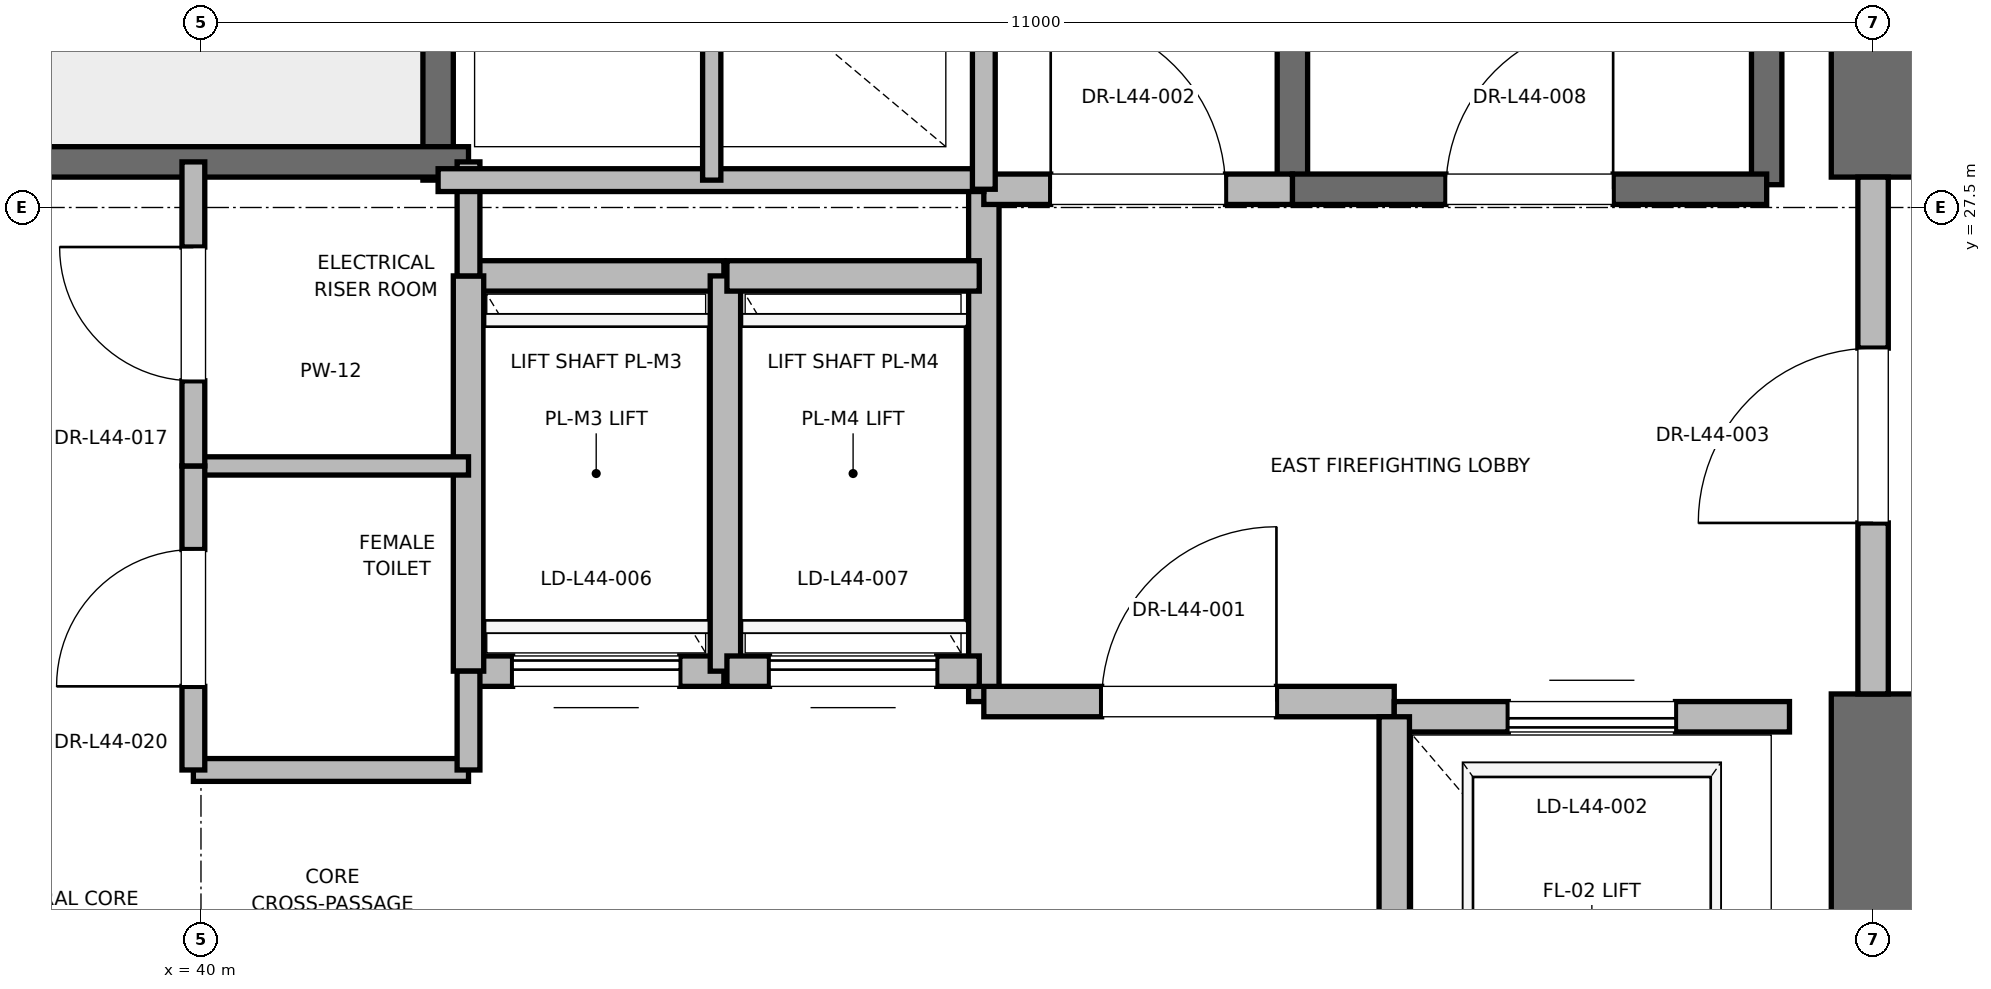
"""IFC4 building model, lengths in metres.
Left out: names, types, materials, properties, quantities, classifications, styles, units other than length and angle.
Written with IfcOpenShell. Run it as: python <this file> out.ifc"""

import sys

from ifc_helpers import new_model, si_unit, direction, frame, frame_2d, origin, place, context, subcontext, project, spatial, rectangle, extrude, element, fill, save


model = new_model("IFC4")
c1 = context("Model", 3, precision=1e-05, world=origin(), true_north=direction((0.0, 1.0)))
c2 = subcontext(c1, "Body", "Model", "MODEL_VIEW")
j1 = project(units=[si_unit("LENGTHUNIT", "METRE"), si_unit("PLANEANGLEUNIT", "RADIAN")], contexts=[c1])
p1 = place(None, origin())
s1 = spatial("IfcSite", under=j1, at=p1, CompositionType="ELEMENT")
p2 = place(p1, origin())
s2 = spatial("IfcBuilding", under=s1, at=p2, CompositionType="ELEMENT")
p3 = place(p2, frame((0.0, 0.0, 189.4)))
s3 = spatial("IfcBuildingStorey", under=s2, at=p3, CompositionType="ELEMENT", Elevation=189.4)
p4 = place(p3, frame((51.0, 18.5, 0.0), z_axis=(0.0, 0.0, 1.0), x_axis=(0.0, 1.0, 0.0)))
e1 = element("IfcWall", 1, at=p4, inside=s3, PredefinedType="SHEAR", context=c2, shape_type="SweptSolid", body=[
    extrude(rectangle(XDim=5.8, YDim=0.55, at=frame_2d((2.9, 0.0))), origin(), (0.0, 0.0, 1.0), 5.1),
])
p5 = place(p3, frame((51.0, 27.7, 0.0), z_axis=(0.0, 0.0, 1.0), x_axis=(0.0, 1.0, 0.0)))
e2 = element("IfcWall", 2, at=p5, inside=s3, PredefinedType="SHEAR", context=c2, shape_type="SweptSolid", body=[
    extrude(rectangle(XDim=8.8, YDim=0.55, at=frame_2d((4.4, 0.0))), origin(), (0.0, 0.0, 1.0), 5.1),
])
p6 = place(p3, frame((50.3, 27.65, 0.0), z_axis=(0.0, 0.0, 1.0), x_axis=(0.0, 1.0, 0.0)))
e3 = element("IfcWall", 3, at=p6, inside=s3, PredefinedType="SOLIDWALL", context=c2, shape_type="SweptSolid", body=[
    extrude(rectangle(XDim=8.15, YDim=0.2, at=frame_2d((4.075, 0.0))), origin(), (0.0, 0.0, 1.0), 5.1),
])
p7 = place(p3, frame((47.18, 27.62, 0.0), z_axis=(0.0, 0.0, 1.0), x_axis=(0.0, 1.0, 0.0)))
e4 = element("IfcWall", 4, at=p7, inside=s3, PredefinedType="SOLIDWALL", context=c2, shape_type="SweptSolid", body=[
    extrude(rectangle(XDim=8.18, YDim=0.2, at=frame_2d((4.09, 0.0))), origin(), (0.0, 0.0, 1.0), 5.1),
])
p8 = place(p3, frame((47.18, 27.62, 0.0), z_axis=(0.0, 0.0, 1.0), x_axis=(1.0, 0.0, 0.0)))
e5 = element("IfcWall", 5, at=p8, inside=s3, PredefinedType="SOLIDWALL", context=c2, shape_type="SweptSolid", body=[
    extrude(rectangle(XDim=3.12, YDim=0.2, at=frame_2d((1.56, 0.0))), origin(), (0.0, 0.0, 1.0), 5.1),
])
p9 = place(p8, frame((1.01, 0.0, 0.0)))
e6 = element("IfcOpeningElement", 6, at=p9, cuts=e5, PredefinedType="OPENING", context=c2, shape_type="SweptSolid", body=[
    extrude(rectangle(XDim=1.1, YDim=2.15, at=frame_2d((0.55, 1.075))), frame((0.0, 0.1, 0.0), z_axis=(0.0, -1.0, 0.0), x_axis=(1.0, 0.0, 0.0)), (0.0, 0.0, 1.0), 0.2),
])
p10 = place(p3, frame((41.56, 27.68, 0.0), z_axis=(0.0, 0.0, 1.0), x_axis=(0.0, 1.0, 0.0)))
e7 = element("IfcWall", 7, at=p10, inside=s3, PredefinedType="SOLIDWALL", context=c2, shape_type="SweptSolid", body=[
    extrude(rectangle(XDim=8.57, YDim=0.2, at=frame_2d((4.285, 0.0))), origin(), (0.0, 0.0, 1.0), 5.1),
])
p11 = place(p3, frame((38.44, 27.8, 0.0), z_axis=(0.0, 0.0, 1.0), x_axis=(1.0, 0.0, 0.0)))
e8 = element("IfcWall", 8, at=p11, inside=s3, PredefinedType="SOLIDWALL", context=c2, shape_type="SweptSolid", body=[
    extrude(rectangle(XDim=3.32, YDim=0.2, at=frame_2d((1.66, 0.0))), origin(), (0.0, 0.0, 1.0), 5.1),
])
p12 = place(p3, frame((45.15, 24.25, 0.0), z_axis=(0.0, 0.0, 1.0), x_axis=(0.0, 1.0, 0.0)))
e9 = element("IfcWall", 9, at=p12, inside=s3, PredefinedType="PARTITIONING", context=c2, shape_type="SweptSolid", body=[
    extrude(rectangle(XDim=3.37, YDim=0.2, at=frame_2d((1.685, 0.0))), origin(), (0.0, 0.0, 1.0), 5.1),
])
p13 = place(p3, frame((45.15, 24.25, 0.0), z_axis=(0.0, 0.0, 1.0), x_axis=(1.0, 0.0, 0.0)))
e10 = element("IfcWall", 10, at=p13, inside=s3, PredefinedType="PARTITIONING", context=c2, shape_type="SweptSolid", body=[
    extrude(rectangle(XDim=2.7, YDim=0.2, at=frame_2d((1.35, 0.0))), origin(), (0.0, 0.0, 1.0), 5.1),
])
p14 = place(p13, frame((0.775, 0.0, 0.0)))
e11 = element("IfcOpeningElement", 11, at=p14, cuts=e10, PredefinedType="OPENING", context=c2, shape_type="SweptSolid", body=[
    extrude(rectangle(XDim=1.15, YDim=2.2, at=frame_2d((0.575, 1.1))), frame((0.0, 0.1, 0.0), z_axis=(0.0, -1.0, 0.0), x_axis=(1.0, 0.0, 0.0)), (0.0, 0.0, 1.0), 0.2),
])
p15 = place(p3, frame((45.15, 27.62, 0.0), z_axis=(0.0, 0.0, 1.0), x_axis=(1.0, 0.0, 0.0)))
e12 = element("IfcWall", 12, at=p15, inside=s3, PredefinedType="PARTITIONING", context=c2, shape_type="SweptSolid", body=[
    extrude(rectangle(XDim=2.03, YDim=0.2, at=frame_2d((1.015, 0.0))), origin(), (0.0, 0.0, 1.0), 5.1),
])
p16 = place(p15, frame((0.44, 0.0, 0.0)))
e13 = element("IfcOpeningElement", 13, at=p16, cuts=e12, PredefinedType="OPENING", context=c2, shape_type="SweptSolid", body=[
    extrude(rectangle(XDim=1.15, YDim=2.2, at=frame_2d((0.575, 1.1))), frame((0.0, 0.1, 0.0), z_axis=(0.0, -1.0, 0.0), x_axis=(1.0, 0.0, 0.0)), (0.0, 0.0, 1.0), 0.2),
])
p17 = place(p3, frame((51.0, 24.3, 0.0), z_axis=(0.0, 0.0, 1.0), x_axis=(0.0, 1.0, 0.0)))
e14 = element("IfcWall", 14, at=p17, inside=s3, PredefinedType="PARTITIONING", context=c2, shape_type="SweptSolid", body=[
    extrude(rectangle(XDim=3.4, YDim=0.2, at=frame_2d((1.7, 0.0))), origin(), (0.0, 0.0, 1.0), 4.08),
])
p18 = place(p17, frame((1.125, 0.0, 0.0)))
e15 = element("IfcOpeningElement", 15, at=p18, cuts=e14, PredefinedType="OPENING", context=c2, shape_type="SweptSolid", body=[
    extrude(rectangle(XDim=1.15, YDim=2.2, at=frame_2d((0.575, 1.1))), frame((0.0, 0.1, 0.0), z_axis=(0.0, -1.0, 0.0), x_axis=(1.0, 0.0, 0.0)), (0.0, 0.0, 1.0), 0.2),
])
p19 = place(p3, frame((50.45, 24.15, 0.0), z_axis=(0.0, 0.0, 1.0), x_axis=(-1.0, 0.0, 0.0)))
e16 = element("IfcWall", 16, at=p19, inside=s3, PredefinedType="SOLIDWALL", context=c2, shape_type="SweptSolid", body=[
    extrude(rectangle(XDim=2.6, YDim=0.2, at=frame_2d((1.3, 0.0))), origin(), (0.0, 0.0, 1.0), 4.08),
])
p20 = place(p19, frame((0.75, 0.0, 0.0)))
e17 = element("IfcOpeningElement", 17, at=p20, cuts=e16, PredefinedType="OPENING", context=c2, shape_type="SweptSolid", body=[
    extrude(rectangle(XDim=1.1, YDim=2.2, at=frame_2d((0.55, 1.1))), frame((0.0, 0.1, 0.0), z_axis=(0.0, -1.0, 0.0), x_axis=(1.0, 0.0, 0.0)), (0.0, 0.0, 1.0), 0.2),
])
p21 = place(p3, frame((47.85, 24.15, 0.0), z_axis=(0.0, 0.0, 1.0), x_axis=(0.0, -1.0, 0.0)))
e18 = element("IfcWall", 18, at=p21, inside=s3, PredefinedType="SOLIDWALL", context=c2, shape_type="SweptSolid", body=[
    extrude(rectangle(XDim=3.0, YDim=0.2, at=frame_2d((1.5, 0.0))), origin(), (0.0, 0.0, 1.0), 5.1),
])
p22 = place(p3, frame((41.76, 24.45, 0.0), z_axis=(0.0, 0.0, 1.0), x_axis=(1.0, 0.0, 0.0)))
e19 = element("IfcWall", 19, at=p22, inside=s3, PredefinedType="SOLIDWALL", context=c2, shape_type="SweptSolid", body=[
    extrude(rectangle(XDim=1.68, YDim=0.2, at=frame_2d((0.84, 0.0))), origin(), (0.0, 0.0, 1.0), 5.1),
])
p23 = place(p22, frame((0.29, 0.0, 0.0)))
e20 = element("IfcOpeningElement", 20, at=p23, cuts=e19, PredefinedType="OPENING", context=c2, shape_type="SweptSolid", body=[
    extrude(rectangle(XDim=1.1, YDim=2.2, at=frame_2d((0.55, 1.1))), frame((0.0, 0.1, 0.0), z_axis=(0.0, -1.0, 0.0), x_axis=(1.0, 0.0, 0.0)), (0.0, 0.0, 1.0), 0.2),
])
p24 = place(p3, frame((43.44, 27.05, 0.0), z_axis=(0.0, 0.0, 1.0), x_axis=(-1.0, 0.0, 0.0)))
e21 = element("IfcWall", 21, at=p24, inside=s3, PredefinedType="SOLIDWALL", context=c2, shape_type="SweptSolid", body=[
    extrude(rectangle(XDim=1.68, YDim=0.2, at=frame_2d((0.84, 0.0))), origin(), (0.0, 0.0, 1.0), 5.1),
])
for number, where, z_axis, x_axis in (
    (22, (41.76, 27.05, 0.0), (0.0, 0.0, 1.0), (0.0, -1.0, 0.0)),
    (23, (43.45, 24.45, 0.0), (0.0, 0.0, 1.0), (0.0, 1.0, 0.0)),
):
    element("IfcWall", number, at=place(p3, frame(where, z_axis=z_axis, x_axis=x_axis)), inside=s3, PredefinedType="SOLIDWALL", context=c2, shape_type="SweptSolid", body=[
        extrude(rectangle(XDim=2.6, YDim=0.2, at=frame_2d((1.3, 0.0))), origin(), (0.0, 0.0, 1.0), 5.1),
    ])
p25 = place(p3, frame((43.46, 24.45, 0.0), z_axis=(0.0, 0.0, 1.0), x_axis=(1.0, 0.0, 0.0)))
e24 = element("IfcWall", 24, at=p25, inside=s3, PredefinedType="SOLIDWALL", context=c2, shape_type="SweptSolid", body=[
    extrude(rectangle(XDim=1.66, YDim=0.2, at=frame_2d((0.83, 0.0))), origin(), (0.0, 0.0, 1.0), 5.1),
])
p26 = place(p25, frame((0.28, 0.0, 0.0)))
e25 = element("IfcOpeningElement", 25, at=p26, cuts=e24, PredefinedType="OPENING", context=c2, shape_type="SweptSolid", body=[
    extrude(rectangle(XDim=1.1, YDim=2.2, at=frame_2d((0.55, 1.1))), frame((0.0, 0.1, 0.0), z_axis=(0.0, -1.0, 0.0), x_axis=(1.0, 0.0, 0.0)), (0.0, 0.0, 1.0), 0.2),
])
p27 = place(p3, frame((45.12, 27.05, 0.0), z_axis=(0.0, 0.0, 1.0), x_axis=(-1.0, 0.0, 0.0)))
e26 = element("IfcWall", 26, at=p27, inside=s3, PredefinedType="SOLIDWALL", context=c2, shape_type="SweptSolid", body=[
    extrude(rectangle(XDim=1.66, YDim=0.2, at=frame_2d((0.83, 0.0))), origin(), (0.0, 0.0, 1.0), 5.1),
])
p28 = place(p3, frame((39.95, 23.8, 0.0), z_axis=(0.0, 0.0, 1.0), x_axis=(1.0, 0.0, 0.0)))
e27 = element("IfcWall", 27, at=p28, inside=s3, PredefinedType="PARTITIONING", context=c2, shape_type="SweptSolid", body=[
    extrude(rectangle(XDim=1.81, YDim=0.15, at=frame_2d((0.905, 0.0))), origin(), (0.0, 0.0, 1.0), 2.85),
])
p29 = place(p3, frame((39.95, 25.8, 0.0), z_axis=(0.0, 0.0, 1.0), x_axis=(1.0, 0.0, 0.0)))
e28 = element("IfcWall", 28, at=p29, inside=s3, PredefinedType="PARTITIONING", context=c2, shape_type="SweptSolid", body=[
    extrude(rectangle(XDim=1.81, YDim=0.12, at=frame_2d((0.905, 0.0))), origin(), (0.0, 0.0, 1.0), 2.85),
])
p30 = place(p3, frame((41.76, 23.8, 0.0), z_axis=(0.0, 0.0, 1.0), x_axis=(0.0, 1.0, 0.0)))
e29 = element("IfcWall", 29, at=p30, inside=s3, PredefinedType="PARTITIONING", context=c2, shape_type="SweptSolid", body=[
    extrude(rectangle(XDim=0.65, YDim=0.15, at=frame_2d((0.325, 0.0))), origin(), (0.0, 0.0, 1.0), 2.85),
])
p31 = place(p3, frame((41.76, 27.05, 0.0), z_axis=(0.0, 0.0, 1.0), x_axis=(0.0, 1.0, 0.0)))
e30 = element("IfcWall", 30, at=p31, inside=s3, PredefinedType="PARTITIONING", context=c2, shape_type="SweptSolid", body=[
    extrude(rectangle(XDim=0.75, YDim=0.15, at=frame_2d((0.375, 0.0))), origin(), (0.0, 0.0, 1.0), 2.85),
])
p32 = place(p3, frame((39.95, 23.8, 0.0), z_axis=(0.0, 0.0, 1.0), x_axis=(0.0, 1.0, 0.0)))
e31 = element("IfcWall", 31, at=p32, inside=s3, PredefinedType="PARTITIONING", context=c2, shape_type="SweptSolid", body=[
    extrude(rectangle(XDim=2.0, YDim=0.15, at=frame_2d((1.0, 0.0))), origin(), (0.0, 0.0, 1.0), 2.85),
])
p33 = place(p32, frame((0.55, 0.0, 0.0)))
e32 = element("IfcOpeningElement", 32, at=p33, cuts=e31, PredefinedType="OPENING", context=c2, shape_type="SweptSolid", body=[
    extrude(rectangle(XDim=0.9, YDim=2.1, at=frame_2d((0.45, 1.05))), frame((0.0, 0.075, 0.0), z_axis=(0.0, -1.0, 0.0), x_axis=(1.0, 0.0, 0.0)), (0.0, 0.0, 1.0), 0.15),
])
p34 = place(p3, frame((39.95, 25.8, 0.0), z_axis=(0.0, 0.0, 1.0), x_axis=(0.0, 1.0, 0.0)))
e33 = element("IfcWall", 33, at=p34, inside=s3, PredefinedType="PARTITIONING", context=c2, shape_type="SweptSolid", body=[
    extrude(rectangle(XDim=2.0, YDim=0.15, at=frame_2d((1.0, 0.0))), origin(), (0.0, 0.0, 1.0), 2.85),
])
p35 = place(p34, frame((0.56, 0.0, 0.0)))
e34 = element("IfcOpeningElement", 34, at=p35, cuts=e33, PredefinedType="OPENING", context=c2, shape_type="SweptSolid", body=[
    extrude(rectangle(XDim=0.88, YDim=2.1, at=frame_2d((0.44, 1.05))), frame((0.0, 0.075, 0.0), z_axis=(0.0, -1.0, 0.0), x_axis=(1.0, 0.0, 0.0)), (0.0, 0.0, 1.0), 0.15),
])
p36 = place(p3, frame((41.56, 27.68, 0.0), z_axis=(0.0, 0.0, 1.0), x_axis=(1.0, 0.0, 0.0)))
e35 = element("IfcWall", 35, at=p36, inside=s3, PredefinedType="PARTITIONING", context=c2, shape_type="SweptSolid", body=[
    extrude(rectangle(XDim=3.59, YDim=0.15, at=frame_2d((1.795, 0.0))), origin(), (0.0, 0.0, 1.0), 2.85),
])
p37 = place(p3, frame((45.15, 27.62, 0.0), z_axis=(0.0, 0.0, 1.0), x_axis=(0.0, 1.0, 0.0)))
e36 = element("IfcWall", 36, at=p37, inside=s3, PredefinedType="PARTITIONING", context=c2, shape_type="SweptSolid", body=[
    extrude(rectangle(XDim=3.1, YDim=0.15, at=frame_2d((1.55, 0.0))), origin(), (0.0, 0.0, 1.0), 2.85),
])
p38 = place(p3, frame((43.36, 27.68, 0.0), z_axis=(0.0, 0.0, 1.0), x_axis=(0.0, 1.0, 0.0)))
e37 = element("IfcWall", 37, at=p38, inside=s3, PredefinedType="PARTITIONING", context=c2, shape_type="SweptSolid", body=[
    extrude(rectangle(XDim=3.04, YDim=0.12, at=frame_2d((1.52, 0.0))), origin(), (0.0, 0.0, 1.0), 2.85),
])
p39 = place(p9, origin())
e38 = element("IfcDoor", 38, at=p39, inside=s3, OperationType="SINGLE_SWING_RIGHT", PredefinedType="DOOR", context=c2, shape_type="SweptSolid", body=[
    extrude(rectangle(XDim=1.1, YDim=2.15, at=frame_2d((0.55, 1.075))), frame((0.0, 0.025, 0.0), z_axis=(0.0, -1.0, 0.0), x_axis=(1.0, 0.0, 0.0)), (0.0, 0.0, 1.0), 0.05),
])
fill(e6, e38)
p40 = place(p14, origin())
e39 = element("IfcDoor", 39, at=p40, inside=s3, OperationType="SINGLE_SWING_RIGHT", PredefinedType="DOOR", context=c2, shape_type="SweptSolid", body=[
    extrude(rectangle(XDim=1.15, YDim=2.2, at=frame_2d((0.575, 1.1))), frame((0.0, 0.025, 0.0), z_axis=(0.0, -1.0, 0.0), x_axis=(1.0, 0.0, 0.0)), (0.0, 0.0, 1.0), 0.05),
])
fill(e11, e39)
p41 = place(p16, origin())
e40 = element("IfcDoor", 40, at=p41, inside=s3, OperationType="SINGLE_SWING_LEFT", PredefinedType="DOOR", context=c2, shape_type="SweptSolid", body=[
    extrude(rectangle(XDim=1.15, YDim=2.2, at=frame_2d((0.575, 1.1))), frame((0.0, 0.025, 0.0), z_axis=(0.0, -1.0, 0.0), x_axis=(1.0, 0.0, 0.0)), (0.0, 0.0, 1.0), 0.05),
])
fill(e13, e40)
p42 = place(p18, origin())
e41 = element("IfcDoor", 41, at=p42, inside=s3, OperationType="SINGLE_SWING_LEFT", PredefinedType="DOOR", context=c2, shape_type="SweptSolid", body=[
    extrude(rectangle(XDim=1.15, YDim=2.2, at=frame_2d((0.575, 1.1))), frame((0.0, 0.025, 0.0), z_axis=(0.0, -1.0, 0.0), x_axis=(1.0, 0.0, 0.0)), (0.0, 0.0, 1.0), 0.05),
])
fill(e15, e41)
p43 = place(p20, origin())
e42 = element("IfcDoor", 42, at=p43, inside=s3, OperationType="SLIDING_TO_RIGHT", PredefinedType="DOOR", context=c2, shape_type="SweptSolid", body=[
    extrude(rectangle(XDim=1.1, YDim=2.2, at=frame_2d((0.55, 1.1))), frame((0.0, 0.025, 0.0), z_axis=(0.0, -1.0, 0.0), x_axis=(1.0, 0.0, 0.0)), (0.0, 0.0, 1.0), 0.05),
])
fill(e17, e42)
p44 = place(p23, origin())
e43 = element("IfcDoor", 43, at=p44, inside=s3, OperationType="SLIDING_TO_RIGHT", PredefinedType="DOOR", context=c2, shape_type="SweptSolid", body=[
    extrude(rectangle(XDim=1.1, YDim=2.2, at=frame_2d((0.55, 1.1))), frame((0.0, 0.025, 0.0), z_axis=(0.0, -1.0, 0.0), x_axis=(1.0, 0.0, 0.0)), (0.0, 0.0, 1.0), 0.05),
])
fill(e20, e43)
p45 = place(p26, origin())
e44 = element("IfcDoor", 44, at=p45, inside=s3, OperationType="SLIDING_TO_RIGHT", PredefinedType="DOOR", context=c2, shape_type="SweptSolid", body=[
    extrude(rectangle(XDim=1.1, YDim=2.2, at=frame_2d((0.55, 1.1))), frame((0.0, 0.025, 0.0), z_axis=(0.0, -1.0, 0.0), x_axis=(1.0, 0.0, 0.0)), (0.0, 0.0, 1.0), 0.05),
])
fill(e25, e44)
p46 = place(p33, origin())
e45 = element("IfcDoor", 45, at=p46, inside=s3, OperationType="SINGLE_SWING_LEFT", PredefinedType="DOOR", context=c2, shape_type="SweptSolid", body=[
    extrude(rectangle(XDim=0.9, YDim=2.1, at=frame_2d((0.45, 1.05))), frame((0.0, 0.025, 0.0), z_axis=(0.0, -1.0, 0.0), x_axis=(1.0, 0.0, 0.0)), (0.0, 0.0, 1.0), 0.05),
])
fill(e32, e45)
p47 = place(p35, origin())
e46 = element("IfcDoor", 46, at=p47, inside=s3, OperationType="SINGLE_SWING_RIGHT", PredefinedType="DOOR", context=c2, shape_type="SweptSolid", body=[
    extrude(rectangle(XDim=0.88, YDim=2.1, at=frame_2d((0.44, 1.05))), frame((0.0, 0.025, 0.0), z_axis=(0.0, -1.0, 0.0), x_axis=(1.0, 0.0, 0.0)), (0.0, 0.0, 1.0), 0.05),
])
fill(e34, e46)
save(model, sys.argv[1])
